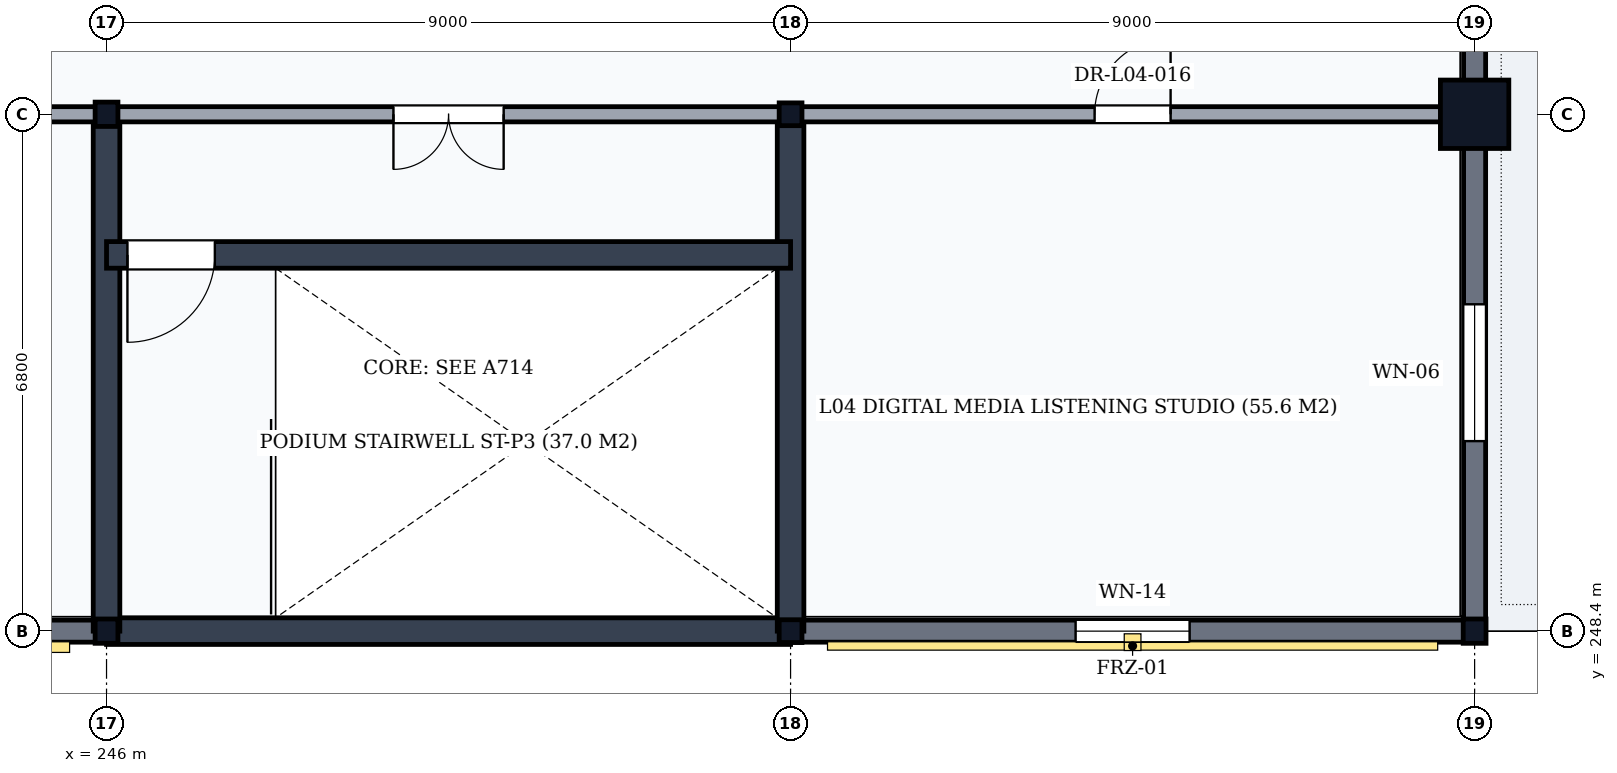
"""IFC4 building model, lengths in metres.
Left out: names, types, materials, properties, quantities, classifications, styles, units other than length and angle.
Written with IfcOpenShell. Run it as: python <this file> out.ifc"""

import sys

from ifc_helpers import new_model, si_unit, direction, frame, frame_2d, origin, origin_2d, place, context, subcontext, project, spatial, rectangle, circle, i_section, extrude, element, fill, save


model = new_model("IFC4")
c1 = context("Model", 3, precision=1e-05, world=origin(), true_north=direction((0.0, 1.0)))
c2 = subcontext(c1, "Body", "Model", "MODEL_VIEW")
j1 = project(units=[si_unit("LENGTHUNIT", "METRE"), si_unit("PLANEANGLEUNIT", "RADIAN")], contexts=[c1])
p1 = place(None, origin())
s1 = spatial("IfcSite", under=j1, at=p1, CompositionType="ELEMENT")
p2 = place(p1, origin())
s2 = spatial("IfcBuilding", under=s1, at=p2, CompositionType="ELEMENT")
p3 = place(p2, frame((0.0, 0.0, 15.6)))
s3 = spatial("IfcBuildingStorey", under=s2, at=p3, CompositionType="ELEMENT", Elevation=15.6)
for number, where, z_axis, x_axis in (
    (1, (246.0, 248.4, 0.0), (0.0, 0.0, 1.0), (1.0, 0.0, 0.0)),
    (2, (246.0, 255.2, 0.0), (0.0, 0.0, 1.0), (1.0, 0.0, 0.0)),
):
    element("IfcColumn", number, at=place(p3, frame(where, z_axis=z_axis, x_axis=x_axis)), inside=s3, PredefinedType="COLUMN", context=c2, shape_type="SweptSolid", body=[
        extrude(i_section(OverallWidth=0.3, OverallDepth=0.32, WebThickness=0.011, FlangeThickness=0.021, FilletRadius=0.027, at=origin_2d()), origin(), (0.0, 0.0, 1.0), 4.8),
    ])
for number, where, z_axis, x_axis in (
    (3, (255.0, 248.4, 0.0), (0.0, 0.0, 1.0), (1.0, 0.0, 0.0)),
    (4, (255.0, 255.2, 0.0), (0.0, 0.0, 1.0), (1.0, 0.0, 0.0)),
):
    element("IfcColumn", number, at=place(p3, frame(where, z_axis=z_axis, x_axis=x_axis)), inside=s3, PredefinedType="COLUMN", context=c2, shape_type="SweptSolid", body=[
        extrude(i_section(OverallWidth=0.3, OverallDepth=0.3, WebThickness=0.011, FlangeThickness=0.019, FilletRadius=0.027, at=origin_2d()), origin(), (0.0, 0.0, 1.0), 4.8),
    ])
p4 = place(p3, frame((264.0, 248.4, 0.0), z_axis=(0.0, 0.0, 1.0), x_axis=(1.0, 0.0, 0.0)))
e5 = element("IfcColumn", 5, at=p4, inside=s3, PredefinedType="COLUMN", context=c2, shape_type="SweptSolid", body=[
    extrude(i_section(OverallWidth=0.3, OverallDepth=0.32, WebThickness=0.011, FlangeThickness=0.021, FilletRadius=0.027, at=origin_2d()), origin(), (0.0, 0.0, 1.0), 4.8),
])
p5 = place(p3, frame((264.0, 255.2, 0.0), z_axis=(0.0, 0.0, 1.0), x_axis=(1.0, 0.0, 0.0)))
e6 = element("IfcColumn", 6, at=p5, inside=s3, PredefinedType="COLUMN", context=c2, shape_type="SweptSolid", body=[
    extrude(circle(Radius=0.45, at=origin_2d()), origin(), (0.0, 0.0, 1.0), 4.8),
])
p6 = place(p3, frame((237.006, 248.4, 0.0), z_axis=(0.0, 0.0, 1.0), x_axis=(1.0, 0.0, 0.0)))
e7 = element("IfcWall", 7, at=p6, inside=s3, PredefinedType="SOLIDWALL", context=c2, shape_type="SweptSolid", body=[
    extrude(rectangle(XDim=8.988, YDim=0.29, at=frame_2d((4.494, 0.0))), origin(), (0.0, 0.0, 1.0), 4.198),
])
p7 = place(p6, frame((3.594, 0.0, 0.95)))
e8 = element("IfcOpeningElement", 8, at=p7, cuts=e7, PredefinedType="OPENING", context=c2, shape_type="SweptSolid", body=[
    extrude(rectangle(XDim=1.8, YDim=2.0, at=frame_2d((0.9, 1.0))), frame((0.0, 0.16, 0.0), z_axis=(0.0, -1.0, 0.0), x_axis=(1.0, 0.0, 0.0)), (0.0, 0.0, 1.0), 0.32),
])
p8 = place(p3, frame((255.006, 248.4, 0.0), z_axis=(0.0, 0.0, 1.0), x_axis=(1.0, 0.0, 0.0)))
e9 = element("IfcWall", 9, at=p8, inside=s3, PredefinedType="SOLIDWALL", context=c2, shape_type="SweptSolid", body=[
    extrude(rectangle(XDim=8.988, YDim=0.29, at=frame_2d((4.494, 0.0))), origin(), (0.0, 0.0, 1.0), 4.198),
])
p9 = place(p8, frame((3.744, 0.0, 0.95)))
e10 = element("IfcOpeningElement", 10, at=p9, cuts=e9, PredefinedType="OPENING", context=c2, shape_type="SweptSolid", body=[
    extrude(rectangle(XDim=1.5, YDim=1.9, at=frame_2d((0.75, 0.95))), frame((0.0, 0.16, 0.0), z_axis=(0.0, -1.0, 0.0), x_axis=(1.0, 0.0, 0.0)), (0.0, 0.0, 1.0), 0.32),
])
p10 = place(p3, frame((264.0, 248.406, 0.0), z_axis=(0.0, 0.0, 1.0), x_axis=(0.0, 1.0, 0.0)))
e11 = element("IfcWall", 11, at=p10, inside=s3, PredefinedType="SOLIDWALL", context=c2, shape_type="SweptSolid", body=[
    extrude(rectangle(XDim=6.788, YDim=0.29, at=frame_2d((3.394, 0.0))), origin(), (0.0, 0.0, 1.0), 4.318),
])
p11 = place(p10, frame((2.494, 0.0, 0.95)))
e12 = element("IfcOpeningElement", 12, at=p11, cuts=e11, PredefinedType="OPENING", context=c2, shape_type="SweptSolid", body=[
    extrude(rectangle(XDim=1.8, YDim=2.6, at=frame_2d((0.9, 1.3))), frame((0.0, 0.16, 0.0), z_axis=(0.0, -1.0, 0.0), x_axis=(1.0, 0.0, 0.0)), (0.0, 0.0, 1.0), 0.32),
])
p12 = place(p3, frame((264.0, 255.206, 0.0), z_axis=(0.0, 0.0, 1.0), x_axis=(0.0, 1.0, 0.0)))
e13 = element("IfcWall", 13, at=p12, inside=s3, PredefinedType="SOLIDWALL", context=c2, shape_type="SweptSolid", body=[
    extrude(rectangle(XDim=7.588, YDim=0.29, at=frame_2d((3.794, 0.0))), origin(), (0.0, 0.0, 1.0), 4.278),
])
p13 = place(p12, frame((4.266, 0.0, 0.95)))
e14 = element("IfcOpeningElement", 14, at=p13, cuts=e13, PredefinedType="OPENING", context=c2, shape_type="SweptSolid", body=[
    extrude(rectangle(XDim=1.6, YDim=2.4, at=frame_2d((0.8, 1.2))), frame((0.0, 0.16, 0.0), z_axis=(0.0, -1.0, 0.0), x_axis=(1.0, 0.0, 0.0)), (0.0, 0.0, 1.0), 0.32),
])
p14 = place(p3, frame((221.1, 248.5, 4.8), z_axis=(0.0, 0.0, 1.0), x_axis=(1.0, 0.0, 0.0)))
e15 = element("IfcWall", 15, at=p14, inside=s3, PredefinedType="PARAPET", context=c2, shape_type="SweptSolid", body=[
    extrude(rectangle(XDim=42.8, YDim=0.18, at=frame_2d((21.4, 0.0))), origin(), (0.0, 0.0, 1.0), 1.2),
])
p15 = place(p3, frame((263.9, 248.6, 4.8), z_axis=(0.0, 0.0, 1.0), x_axis=(0.0, 1.0, 0.0)))
e16 = element("IfcWall", 16, at=p15, inside=s3, PredefinedType="PARAPET", context=c2, shape_type="SweptSolid", body=[
    extrude(rectangle(XDim=21.6, YDim=0.18, at=frame_2d((10.8, 0.0))), origin(), (0.0, 0.0, 1.0), 1.2),
])
p16 = place(p3, frame((246.0, 248.4, 0.0), z_axis=(0.0, 0.0, 1.0), x_axis=(1.0, 0.0, 0.0)))
e17 = element("IfcWall", 17, at=p16, inside=s3, PredefinedType="SHEAR", context=c2, shape_type="SweptSolid", body=[
    extrude(rectangle(XDim=9.0, YDim=0.35, at=frame_2d((4.5, 0.0))), origin(), (0.0, 0.0, 1.0), 4.55),
])
for number, where, z_axis, x_axis in (
    (18, (246.0, 248.4, 0.0), (0.0, 0.0, 1.0), (0.0, 1.0, 0.0)),
    (19, (255.0, 248.4, 0.0), (0.0, 0.0, 1.0), (0.0, 1.0, 0.0)),
):
    element("IfcWall", number, at=place(p3, frame(where, z_axis=z_axis, x_axis=x_axis)), inside=s3, PredefinedType="SHEAR", context=c2, shape_type="SweptSolid", body=[
        extrude(rectangle(XDim=6.8, YDim=0.35, at=frame_2d((3.4, 0.0))), origin(), (0.0, 0.0, 1.0), 4.55),
    ])
p17 = place(p3, frame((246.0, 253.35, 0.0), z_axis=(0.0, 0.0, 1.0), x_axis=(1.0, 0.0, 0.0)))
e20 = element("IfcWall", 20, at=p17, inside=s3, PredefinedType="SHEAR", context=c2, shape_type="SweptSolid", body=[
    extrude(rectangle(XDim=9.0, YDim=0.35, at=frame_2d((4.5, 0.0))), origin(), (0.0, 0.0, 1.0), 4.55),
])
p18 = place(p17, frame((0.275, 0.0, 0.0)))
e21 = element("IfcOpeningElement", 21, at=p18, cuts=e20, PredefinedType="OPENING", context=c2, shape_type="SweptSolid", body=[
    extrude(rectangle(XDim=1.15, YDim=2.15, at=frame_2d((0.575, 1.075))), frame((0.0, 0.19, 0.0), z_axis=(0.0, -1.0, 0.0), x_axis=(1.0, 0.0, 0.0)), (0.0, 0.0, 1.0), 0.38),
])
p19 = place(p3, frame((246.0, 255.2, 0.0), z_axis=(0.0, 0.0, 1.0), x_axis=(1.0, 0.0, 0.0)))
e22 = element("IfcWall", 22, at=p19, inside=s3, PredefinedType="PARTITIONING", context=c2, shape_type="SweptSolid", body=[
    extrude(rectangle(XDim=9.0, YDim=0.2, at=frame_2d((4.5, 0.0))), origin(), (0.0, 0.0, 1.0), 3.898),
])
p20 = place(p19, frame((3.775, 0.0, 0.0)))
e23 = element("IfcOpeningElement", 23, at=p20, cuts=e22, PredefinedType="OPENING", context=c2, shape_type="SweptSolid", body=[
    extrude(rectangle(XDim=1.45, YDim=2.2, at=frame_2d((0.725, 1.1))), frame((0.0, 0.115, 0.0), z_axis=(0.0, -1.0, 0.0), x_axis=(1.0, 0.0, 0.0)), (0.0, 0.0, 1.0), 0.23),
])
p21 = place(p3, frame((237.0, 255.2, 0.0), z_axis=(0.0, 0.0, 1.0), x_axis=(1.0, 0.0, 0.0)))
e24 = element("IfcWall", 24, at=p21, inside=s3, PredefinedType="PARTITIONING", context=c2, shape_type="SweptSolid", body=[
    extrude(rectangle(XDim=9.0, YDim=0.2, at=frame_2d((4.5, 0.0))), origin(), (0.0, 0.0, 1.0), 3.898),
])
p22 = place(p21, frame((4.0, 0.0, 0.0)))
e25 = element("IfcOpeningElement", 25, at=p22, cuts=e24, PredefinedType="OPENING", context=c2, shape_type="SweptSolid", body=[
    extrude(rectangle(XDim=1.0, YDim=2.1, at=frame_2d((0.5, 1.05))), frame((0.0, 0.115, 0.0), z_axis=(0.0, -1.0, 0.0), x_axis=(1.0, 0.0, 0.0)), (0.0, 0.0, 1.0), 0.23),
])
p23 = place(p3, frame((255.0, 255.2, 0.0), z_axis=(0.0, 0.0, 1.0), x_axis=(1.0, 0.0, 0.0)))
e26 = element("IfcWall", 26, at=p23, inside=s3, PredefinedType="PARTITIONING", context=c2, shape_type="SweptSolid", body=[
    extrude(rectangle(XDim=9.0, YDim=0.2, at=frame_2d((4.5, 0.0))), origin(), (0.0, 0.0, 1.0), 3.898),
])
p24 = place(p23, frame((4.0, 0.0, 0.0)))
e27 = element("IfcOpeningElement", 27, at=p24, cuts=e26, PredefinedType="OPENING", context=c2, shape_type="SweptSolid", body=[
    extrude(rectangle(XDim=1.0, YDim=2.1, at=frame_2d((0.5, 1.05))), frame((0.0, 0.115, 0.0), z_axis=(0.0, -1.0, 0.0), x_axis=(1.0, 0.0, 0.0)), (0.0, 0.0, 1.0), 0.23),
])
p25 = place(p9, origin())
e28 = element("IfcWindow", 28, at=p25, inside=s3, PartitioningType="SINGLE_PANEL", PredefinedType="WINDOW", context=c2, shape_type="SweptSolid", body=[
    extrude(rectangle(XDim=1.5, YDim=1.9, at=frame_2d((0.75, 0.95))), frame((0.0, 0.03, 0.0), z_axis=(0.0, -1.0, 0.0), x_axis=(1.0, 0.0, 0.0)), (0.0, 0.0, 1.0), 0.06),
])
fill(e10, e28)
p26 = place(p11, origin())
e29 = element("IfcWindow", 29, at=p26, inside=s3, PartitioningType="DOUBLE_PANEL_VERTICAL", PredefinedType="WINDOW", context=c2, shape_type="SweptSolid", body=[
    extrude(rectangle(XDim=1.8, YDim=2.6, at=frame_2d((0.9, 1.3))), frame((0.0, 0.03, 0.0), z_axis=(0.0, -1.0, 0.0), x_axis=(1.0, 0.0, 0.0)), (0.0, 0.0, 1.0), 0.06),
])
fill(e12, e29)
p27 = place(p18, frame((1.15, 0.0, 0.0), z_axis=(0.0, 0.0, 1.0), x_axis=(-1.0, 0.0, 0.0)))
e30 = element("IfcDoor", 30, at=p27, inside=s3, OperationType="SINGLE_SWING_RIGHT", PredefinedType="DOOR", context=c2, shape_type="SweptSolid", body=[
    extrude(rectangle(XDim=1.15, YDim=2.15, at=frame_2d((0.575, 1.075))), frame((0.0, 0.025, 0.0), z_axis=(0.0, -1.0, 0.0), x_axis=(1.0, 0.0, 0.0)), (0.0, 0.0, 1.0), 0.05),
])
fill(e21, e30)
p28 = place(p20, frame((1.45, 0.0, 0.0), z_axis=(0.0, 0.0, 1.0), x_axis=(-1.0, 0.0, 0.0)))
e31 = element("IfcDoor", 31, at=p28, inside=s3, OperationType="DOUBLE_DOOR_SINGLE_SWING", PredefinedType="DOOR", context=c2, shape_type="SweptSolid", body=[
    extrude(rectangle(XDim=1.45, YDim=2.2, at=frame_2d((0.725, 1.1))), frame((0.0, 0.025, 0.0), z_axis=(0.0, -1.0, 0.0), x_axis=(1.0, 0.0, 0.0)), (0.0, 0.0, 1.0), 0.05),
])
fill(e23, e31)
p29 = place(p24, frame((1.0, 0.0, 0.0), z_axis=(0.0, 0.0, 1.0), x_axis=(-1.0, 0.0, 0.0)))
e32 = element("IfcDoor", 32, at=p29, inside=s3, OperationType="SINGLE_SWING_LEFT", PredefinedType="DOOR", context=c2, shape_type="SweptSolid", body=[
    extrude(rectangle(XDim=1.0, YDim=2.1, at=frame_2d((0.5, 1.05))), frame((0.0, 0.025, 0.0), z_axis=(0.0, -1.0, 0.0), x_axis=(1.0, 0.0, 0.0)), (0.0, 0.0, 1.0), 0.05),
])
fill(e27, e32)
save(model, sys.argv[1])
